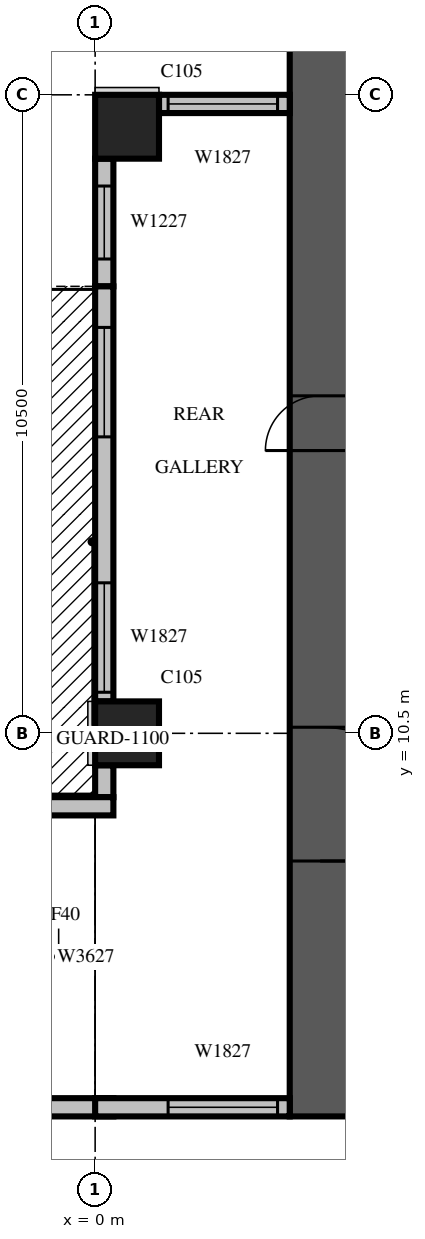
"""IFC4 building model, lengths in metres.
Left out: names, types, materials, properties, quantities, classifications, styles, units other than length and angle.
Written with IfcOpenShell. Run it as: python <this file> out.ifc"""

import sys

from ifc_helpers import new_model, si_unit, direction, frame, frame_2d, origin, origin_2d, place, context, subcontext, project, spatial, rectangle, extrude, source, transform, mapped, element, fill, save


model = new_model("IFC4")
c1 = context("Model", 3, precision=1e-05, world=origin(), true_north=direction((0.0, 1.0)))
c2 = subcontext(c1, "Body", "Model", "MODEL_VIEW")
j1 = project(units=[si_unit("LENGTHUNIT", "METRE"), si_unit("PLANEANGLEUNIT", "RADIAN")], contexts=[c1])
p1 = place(None, origin())
s1 = spatial("IfcSite", under=j1, at=p1, CompositionType="ELEMENT")
p2 = place(p1, origin())
s2 = spatial("IfcBuilding", under=s1, at=p2, CompositionType="ELEMENT")
p3 = place(p2, frame((0.0, 0.0, 107.7)))
s3 = spatial("IfcBuildingStorey", under=s2, at=p3, CompositionType="ELEMENT", Elevation=107.7)
m1 = source(origin(), c2, "Body", "SweptSolid", [
    extrude(rectangle(XDim=1.05, YDim=1.05, at=origin_2d()), origin(), (0.0, 0.0, 1.0), 4.2),
])
for number, where, z_axis, x_axis in (
    (1, (0.525, 10.5, 0.0), (0.0, 0.0, 1.0), (1.0, 0.0, 0.0)),
    (2, (0.525, 20.475, 0.0), (0.0, 0.0, 1.0), (1.0, 0.0, 0.0)),
):
    element("IfcColumn", number, at=place(p3, frame(where, z_axis=z_axis, x_axis=x_axis)), inside=s3, PredefinedType="COLUMN", context=c2, shape_type="MappedRepresentation", body=[
        mapped(m1, transform((0.0, 0.0, 0.0), scale=1.0)),
    ])
m2 = source(origin(), c2, "Body", "SweptSolid", [
    extrude(rectangle(XDim=17.8, YDim=1.0, at=frame_2d((8.9, 0.0))), origin(), (0.0, 0.0, 1.0), 4.2),
])
p4 = place(p3, frame((3.7, 4.2, 0.0), z_axis=(0.0, 0.0, 1.0), x_axis=(0.0, 1.0, 0.0)))
e3 = element("IfcWall", 3, at=p4, inside=s3, PredefinedType="SHEAR", context=c2, shape_type="MappedRepresentation", body=[
    mapped(m2, transform((0.0, 0.0, 0.0), scale=1.0)),
])
m3 = source(origin(), c2, "Body", "SweptSolid", [
    extrude(rectangle(XDim=2.2, YDim=2.1, at=frame_2d((1.1, 1.05))), frame((0.0, 0.51, 0.0), z_axis=(0.0, -1.0, 0.0), x_axis=(1.0, 0.0, 0.0)), (0.0, 0.0, 1.0), 1.02),
])
p5 = place(p4, frame((4.2, 0.0, 0.0)))
e4 = element("IfcOpeningElement", 4, at=p5, cuts=e3, PredefinedType="OPENING", context=c2, shape_type="MappedRepresentation", body=[
    mapped(m3, transform((0.0, 0.0, 0.0), scale=1.0)),
])
m4 = source(origin(), c2, "Body", "SweptSolid", [
    extrude(rectangle(XDim=0.9, YDim=2.1, at=frame_2d((0.45, 1.05))), frame((0.0, 0.51, 0.0), z_axis=(0.0, -1.0, 0.0), x_axis=(1.0, 0.0, 0.0)), (0.0, 0.0, 1.0), 1.02),
])
p6 = place(p4, frame((10.95, 0.0, 0.0)))
e5 = element("IfcOpeningElement", 5, at=p6, cuts=e3, PredefinedType="OPENING", context=c2, shape_type="MappedRepresentation", body=[
    mapped(m4, transform((0.0, 0.0, 0.0), scale=1.0)),
])
m5 = source(origin(), c2, "Body", "SweptSolid", [
    extrude(rectangle(XDim=2.15, YDim=0.3, at=frame_2d((1.075, 0.0))), origin(), (0.0, 0.0, 1.0), 3.8),
])
p7 = place(p3, frame((3.2, 20.85, 0.0), z_axis=(0.0, 0.0, 1.0), x_axis=(-1.0, 0.0, 0.0)))
e6 = element("IfcWall", 6, at=p7, inside=s3, PredefinedType="STANDARD", context=c2, shape_type="MappedRepresentation", body=[
    mapped(m5, transform((0.0, 0.0, 0.0), scale=1.0)),
])
m6 = source(origin(), c2, "Body", "SweptSolid", [
    extrude(rectangle(XDim=1.8, YDim=2.7, at=frame_2d((0.9, 1.35))), frame((0.0, 0.16, 0.0), z_axis=(0.0, -1.0, 0.0), x_axis=(1.0, 0.0, 0.0)), (0.0, 0.0, 1.0), 0.32),
])
p8 = place(p7, frame((0.2, 0.0, 0.6)))
e7 = element("IfcOpeningElement", 7, at=p8, cuts=e6, PredefinedType="OPENING", context=c2, shape_type="MappedRepresentation", body=[
    mapped(m6, transform((0.0, 0.0, 0.0), scale=1.0)),
])
m7 = source(origin(), c2, "Body", "SweptSolid", [
    extrude(rectangle(XDim=2.1, YDim=0.3, at=frame_2d((1.05, 0.0))), origin(), (0.0, 0.0, 1.0), 3.8),
])
p9 = place(p3, frame((0.15, 19.95, 0.0), z_axis=(0.0, 0.0, 1.0), x_axis=(0.0, -1.0, 0.0)))
e8 = element("IfcWall", 8, at=p9, inside=s3, PredefinedType="STANDARD", context=c2, shape_type="MappedRepresentation", body=[
    mapped(m7, transform((0.0, 0.0, 0.0), scale=1.0)),
])
m8 = source(origin(), c2, "Body", "SweptSolid", [
    extrude(rectangle(XDim=1.2, YDim=2.7, at=frame_2d((0.6, 1.35))), frame((0.0, 0.16, 0.0), z_axis=(0.0, -1.0, 0.0), x_axis=(1.0, 0.0, 0.0)), (0.0, 0.0, 1.0), 0.32),
])
p10 = place(p9, frame((0.45, 0.0, 0.6)))
e9 = element("IfcOpeningElement", 9, at=p10, cuts=e8, PredefinedType="OPENING", context=c2, shape_type="MappedRepresentation", body=[
    mapped(m8, transform((0.0, 0.0, 0.0), scale=1.0)),
])
m9 = source(origin(), c2, "Body", "SweptSolid", [
    extrude(rectangle(XDim=6.825, YDim=0.3, at=frame_2d((3.413, 0.0))), origin(), (0.0, 0.0, 1.0), 3.8),
])
p11 = place(p3, frame((0.15, 17.85, 0.0), z_axis=(0.0, 0.0, 1.0), x_axis=(0.0, -1.0, 0.0)))
e10 = element("IfcWall", 10, at=p11, inside=s3, PredefinedType="STANDARD", context=c2, shape_type="MappedRepresentation", body=[
    mapped(m9, transform((0.0, 0.0, 0.0), scale=1.0)),
])
m10 = source(origin(), c2, "Body", "SweptSolid", [
    extrude(rectangle(XDim=1.8, YDim=2.4, at=frame_2d((0.9, 1.2))), frame((0.0, 0.16, 0.0), z_axis=(0.0, -1.0, 0.0), x_axis=(1.0, 0.0, 0.0)), (0.0, 0.0, 1.0), 0.32),
])
p12 = place(p11, frame((0.675, 0.0, 0.0)))
e11 = element("IfcOpeningElement", 11, at=p12, cuts=e10, PredefinedType="OPENING", context=c2, shape_type="MappedRepresentation", body=[
    mapped(m10, transform((0.0, 0.0, 0.0), scale=1.0)),
])
p13 = place(p11, frame((4.875, 0.0, 0.6)))
e12 = element("IfcOpeningElement", 12, at=p13, cuts=e10, PredefinedType="OPENING", context=c2, shape_type="MappedRepresentation", body=[
    mapped(m6, transform((0.0, 0.0, 0.0), scale=1.0)),
])
p14 = place(p3, frame((0.15, 9.975, 0.0), z_axis=(0.0, 0.0, 1.0), x_axis=(0.0, -1.0, 0.0)))
e13 = element("IfcWall", 13, at=p14, inside=s3, PredefinedType="STANDARD", context=c2, shape_type="SweptSolid", body=[
    extrude(rectangle(XDim=0.525, YDim=0.3, at=frame_2d((0.263, 0.0))), origin(), (0.0, 0.0, 1.0), 3.8),
])
m11 = source(origin(), c2, "Body", "SweptSolid", [
    extrude(rectangle(XDim=1.2, YDim=0.3, at=frame_2d((0.6, 0.0))), origin(), (0.0, 0.0, 1.0), 3.8),
])
for number, where, z_axis, x_axis in (
    (14, (0.3, 9.3, 0.0), (0.0, 0.0, 1.0), (-1.0, 0.0, 0.0)),
    (15, (0.3, 4.35, 0.0), (0.0, 0.0, 1.0), (-1.0, 0.0, 0.0)),
):
    element("IfcWall", number, at=place(p3, frame(where, z_axis=z_axis, x_axis=x_axis)), inside=s3, PredefinedType="STANDARD", context=c2, shape_type="MappedRepresentation", body=[
        mapped(m11, transform((0.0, 0.0, 0.0), scale=1.0)),
    ])
m12 = source(origin(), c2, "Body", "SweptSolid", [
    extrude(rectangle(XDim=3.2, YDim=0.3, at=frame_2d((1.6, 0.0))), origin(), (0.0, 0.0, 1.0), 3.8),
])
p15 = place(p3, frame((0.0, 4.35, 0.0), z_axis=(0.0, 0.0, 1.0), x_axis=(1.0, 0.0, 0.0)))
e16 = element("IfcWall", 16, at=p15, inside=s3, PredefinedType="STANDARD", context=c2, shape_type="MappedRepresentation", body=[
    mapped(m12, transform((0.0, 0.0, 0.0), scale=1.0)),
])
p16 = place(p15, frame((1.2, 0.0, 0.6)))
e17 = element("IfcOpeningElement", 17, at=p16, cuts=e16, PredefinedType="OPENING", context=c2, shape_type="MappedRepresentation", body=[
    mapped(m6, transform((0.0, 0.0, 0.0), scale=1.0)),
])
m13 = source(origin(), c2, "Body", "SweptSolid", [
    extrude(rectangle(XDim=1.8, YDim=2.7, at=frame_2d((0.9, 1.35))), frame((0.0, 0.03, 0.0), z_axis=(0.0, -1.0, 0.0), x_axis=(1.0, 0.0, 0.0)), (0.0, 0.0, 1.0), 0.06),
])
p17 = place(p8, origin())
e18 = element("IfcWindow", 18, at=p17, inside=s3, PartitioningType="SINGLE_PANEL", PredefinedType="WINDOW", context=c2, shape_type="MappedRepresentation", body=[
    mapped(m13, transform((0.0, 0.0, 0.0), scale=1.0)),
])
fill(e7, e18)
m14 = source(origin(), c2, "Body", "SweptSolid", [
    extrude(rectangle(XDim=1.2, YDim=2.7, at=frame_2d((0.6, 1.35))), frame((0.0, 0.03, 0.0), z_axis=(0.0, -1.0, 0.0), x_axis=(1.0, 0.0, 0.0)), (0.0, 0.0, 1.0), 0.06),
])
p18 = place(p10, origin())
e19 = element("IfcWindow", 19, at=p18, inside=s3, PartitioningType="SINGLE_PANEL", PredefinedType="WINDOW", context=c2, shape_type="MappedRepresentation", body=[
    mapped(m14, transform((0.0, 0.0, 0.0), scale=1.0)),
])
fill(e9, e19)
m15 = source(origin(), c2, "Body", "SweptSolid", [
    extrude(rectangle(XDim=1.8, YDim=2.4, at=frame_2d((0.9, 1.2))), frame((0.0, 0.025, 0.0), z_axis=(0.0, -1.0, 0.0), x_axis=(1.0, 0.0, 0.0)), (0.0, 0.0, 1.0), 0.05),
])
p19 = place(p12, origin())
e20 = element("IfcDoor", 20, at=p19, inside=s3, OperationType="SLIDING_TO_LEFT", PredefinedType="DOOR", context=c2, shape_type="MappedRepresentation", body=[
    mapped(m15, transform((0.0, 0.0, 0.0), scale=1.0)),
])
fill(e11, e20)
p20 = place(p13, origin())
e21 = element("IfcWindow", 21, at=p20, inside=s3, PartitioningType="SINGLE_PANEL", PredefinedType="WINDOW", context=c2, shape_type="MappedRepresentation", body=[
    mapped(m13, transform((0.0, 0.0, 0.0), scale=1.0)),
])
fill(e12, e21)
p21 = place(p16, origin())
e22 = element("IfcWindow", 22, at=p21, inside=s3, PartitioningType="SINGLE_PANEL", PredefinedType="WINDOW", context=c2, shape_type="MappedRepresentation", body=[
    mapped(m13, transform((0.0, 0.0, 0.0), scale=1.0)),
])
fill(e17, e22)
m16 = source(origin(), c2, "Body", "SweptSolid", [
    extrude(rectangle(XDim=2.2, YDim=2.1, at=frame_2d((1.1, 1.05))), frame((0.0, 0.025, 0.0), z_axis=(0.0, -1.0, 0.0), x_axis=(1.0, 0.0, 0.0)), (0.0, 0.0, 1.0), 0.05),
])
p22 = place(p5, origin())
e23 = element("IfcDoor", 23, at=p22, inside=s3, OperationType="DOUBLE_DOOR_SINGLE_SWING", PredefinedType="DOOR", context=c2, shape_type="MappedRepresentation", body=[
    mapped(m16, transform((0.0, 0.0, 0.0), scale=1.0)),
])
fill(e4, e23)
m17 = source(origin(), c2, "Body", "SweptSolid", [
    extrude(rectangle(XDim=0.9, YDim=2.1, at=frame_2d((0.45, 1.05))), frame((0.0, 0.025, 0.0), z_axis=(0.0, -1.0, 0.0), x_axis=(1.0, 0.0, 0.0)), (0.0, 0.0, 1.0), 0.05),
])
p23 = place(p6, origin())
e24 = element("IfcDoor", 24, at=p23, inside=s3, OperationType="SINGLE_SWING_LEFT", PredefinedType="DOOR", context=c2, shape_type="MappedRepresentation", body=[
    mapped(m17, transform((0.0, 0.0, 0.0), scale=1.0)),
])
fill(e5, e24)
save(model, sys.argv[1])
